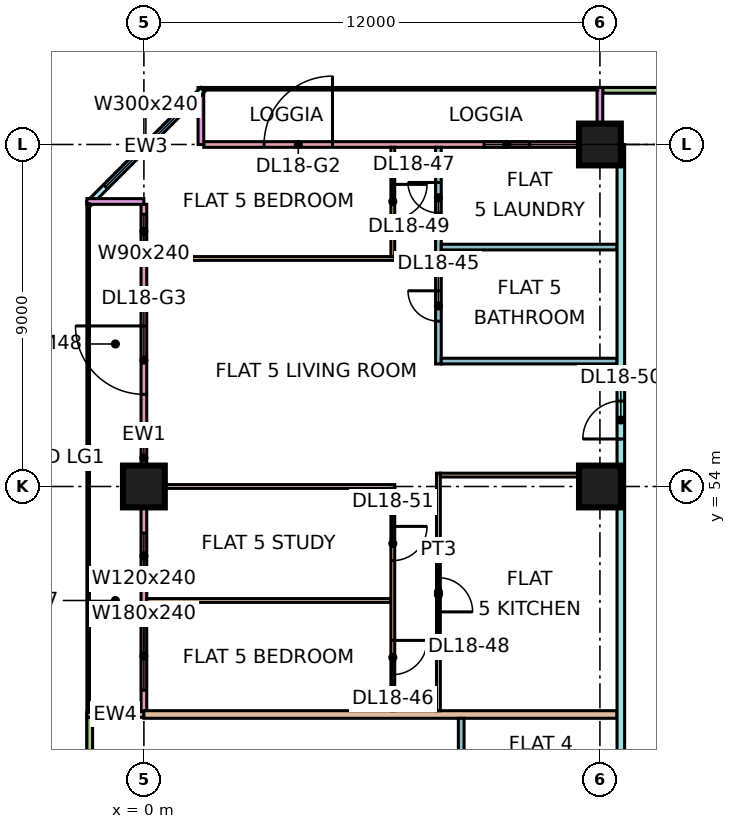
"""IFC4 building model, lengths in metres.
Left out: names, types, materials, properties, quantities, classifications, styles, units other than length and angle.
Written with IfcOpenShell. Run it as: python <this file> out.ifc"""

import sys

from ifc_helpers import new_model, si_unit, direction, frame, frame_2d, origin, origin_2d, place, context, subcontext, project, spatial, rectangle, extrude, element, fill, save


model = new_model("IFC4")
c1 = context("Model", 3, precision=1e-05, world=origin(), true_north=direction((0.0, 1.0)))
c2 = subcontext(c1, "Body", "Model", "MODEL_VIEW")
j1 = project(units=[si_unit("LENGTHUNIT", "METRE"), si_unit("PLANEANGLEUNIT", "RADIAN")], contexts=[c1])
p1 = place(None, origin())
s1 = spatial("IfcSite", under=j1, at=p1, CompositionType="ELEMENT")
p2 = place(p1, origin())
s2 = spatial("IfcBuilding", under=s1, at=p2, CompositionType="ELEMENT")
p3 = place(p2, frame((0.0, 0.0, 82.65)))
s3 = spatial("IfcBuildingStorey", under=s2, at=p3, CompositionType="ELEMENT", Elevation=82.65)
for number, where, z_axis, x_axis in (
    (1, (0.0, 54.0, 0.0), (0.0, 0.0, 1.0), (1.0, 0.0, 0.0)),
    (2, (12.0, 54.0, 0.0), (0.0, 0.0, 1.0), (1.0, 0.0, 0.0)),
    (3, (12.0, 63.0, 0.0), (0.0, 0.0, 1.0), (1.0, 0.0, 0.0)),
):
    element("IfcColumn", number, at=place(p3, frame(where, z_axis=z_axis, x_axis=x_axis)), inside=s3, PredefinedType="COLUMN", context=c2, shape_type="SweptSolid", body=[
        extrude(rectangle(XDim=1.1, YDim=1.1, at=origin_2d()), origin(), (0.0, 0.0, 1.0), 3.75),
    ])
p4 = place(p3, frame((22.5, 64.425, 0.0), z_axis=(0.0, 0.0, 1.0), x_axis=(-1.0, 0.0, 0.0)))
e4 = element("IfcWall", 4, at=p4, inside=s3, PredefinedType="SOLIDWALL", context=c2, shape_type="SweptSolid", body=[
    extrude(rectangle(XDim=10.425, YDim=0.15, at=frame_2d((5.212, 0.0))), origin(), (0.0, 0.0, 1.0), 3.3),
])
p5 = place(p4, frame((1.95, 0.0, 0.45)))
e5 = element("IfcOpeningElement", 5, at=p5, cuts=e4, PredefinedType="OPENING", context=c2, shape_type="SweptSolid", body=[
    extrude(rectangle(XDim=3.0, YDim=2.4, at=frame_2d((1.5, 1.2))), frame((0.0, 0.085, 0.0), z_axis=(0.0, -1.0, 0.0), x_axis=(1.0, 0.0, 0.0)), (0.0, 0.0, 1.0), 0.17),
])
p6 = place(p3, frame((11.925, 63.0, 0.0), z_axis=(0.0, 0.0, 1.0), x_axis=(-1.0, 0.0, 0.0)))
e6 = element("IfcWall", 6, at=p6, inside=s3, PredefinedType="SOLIDWALL", context=c2, shape_type="SweptSolid", body=[
    extrude(rectangle(XDim=10.35, YDim=0.15, at=frame_2d((5.175, 0.0))), origin(), (0.0, 0.0, 1.0), 3.3),
])
p7 = place(p6, frame((1.775, 0.0, 1.7)))
e7 = element("IfcOpeningElement", 7, at=p7, cuts=e6, PredefinedType="OPENING", context=c2, shape_type="SweptSolid", body=[
    extrude(rectangle(XDim=1.2, YDim=0.9, at=frame_2d((0.6, 0.45))), frame((0.0, 0.085, 0.0), z_axis=(0.0, -1.0, 0.0), x_axis=(1.0, 0.0, 0.0)), (0.0, 0.0, 1.0), 0.17),
])
p8 = place(p6, frame((6.962, 0.0, 0.0)))
e8 = element("IfcOpeningElement", 8, at=p8, cuts=e6, PredefinedType="OPENING", context=c2, shape_type="SweptSolid", body=[
    extrude(rectangle(XDim=1.8, YDim=2.4, at=frame_2d((0.9, 1.2))), frame((0.0, 0.085, 0.0), z_axis=(0.0, -1.0, 0.0), x_axis=(1.0, 0.0, 0.0)), (0.0, 0.0, 1.0), 0.17),
])
for number, where, z_axis, x_axis in (
    (9, (12.0, 64.5, 0.0), (0.0, 0.0, 1.0), (0.0, -1.0, 0.0)),
    (10, (1.5, 64.5, 0.0), (0.0, 0.0, 1.0), (0.0, -1.0, 0.0)),
):
    element("IfcWall", number, at=place(p3, frame(where, z_axis=z_axis, x_axis=x_axis)), inside=s3, PredefinedType="SOLIDWALL", context=c2, shape_type="SweptSolid", body=[
        extrude(rectangle(XDim=1.5, YDim=0.15, at=frame_2d((0.75, 0.0))), origin(), (0.0, 0.0, 1.0), 3.3),
    ])
p9 = place(p3, frame((1.553, 64.447, 0.0), z_axis=(0.0, 0.0, 1.0), x_axis=(-0.707106781187, -0.707106781187, 0.0)))
e11 = element("IfcWall", 11, at=p9, inside=s3, PredefinedType="SOLIDWALL", context=c2, shape_type="SweptSolid", body=[
    extrude(rectangle(XDim=4.243, YDim=0.15, at=frame_2d((2.121, 0.0))), origin(), (0.0, 0.0, 1.0), 3.3),
])
p10 = place(p9, frame((0.621, 0.0, 0.45)))
e12 = element("IfcOpeningElement", 12, at=p10, cuts=e11, PredefinedType="OPENING", context=c2, shape_type="SweptSolid", body=[
    extrude(rectangle(XDim=3.0, YDim=2.4, at=frame_2d((1.5, 1.2))), frame((0.0, 0.085, 0.0), z_axis=(0.0, -1.0, 0.0), x_axis=(1.0, 0.0, 0.0)), (0.0, 0.0, 1.0), 0.17),
])
p11 = place(p3, frame((0.0, 61.425, 0.0), z_axis=(0.0, 0.0, 1.0), x_axis=(0.0, -1.0, 0.0)))
e13 = element("IfcWall", 13, at=p11, inside=s3, PredefinedType="SOLIDWALL", context=c2, shape_type="SweptSolid", body=[
    extrude(rectangle(XDim=13.35, YDim=0.15, at=frame_2d((6.675, 0.0))), origin(), (0.0, 0.0, 1.0), 3.3),
])
p12 = place(p11, frame((0.262, 0.0, 0.45)))
e14 = element("IfcOpeningElement", 14, at=p12, cuts=e13, PredefinedType="OPENING", context=c2, shape_type="SweptSolid", body=[
    extrude(rectangle(XDim=0.9, YDim=2.4, at=frame_2d((0.45, 1.2))), frame((0.0, 0.085, 0.0), z_axis=(0.0, -1.0, 0.0), x_axis=(1.0, 0.0, 0.0)), (0.0, 0.0, 1.0), 0.17),
])
p13 = place(p11, frame((3.2, 0.0, 0.0)))
e15 = element("IfcOpeningElement", 15, at=p13, cuts=e13, PredefinedType="OPENING", context=c2, shape_type="SweptSolid", body=[
    extrude(rectangle(XDim=1.8, YDim=2.4, at=frame_2d((0.9, 1.2))), frame((0.0, 0.085, 0.0), z_axis=(0.0, -1.0, 0.0), x_axis=(1.0, 0.0, 0.0)), (0.0, 0.0, 1.0), 0.17),
])
p14 = place(p11, frame((8.65, 0.0, 0.45)))
e16 = element("IfcOpeningElement", 16, at=p14, cuts=e13, PredefinedType="OPENING", context=c2, shape_type="SweptSolid", body=[
    extrude(rectangle(XDim=1.2, YDim=2.4, at=frame_2d((0.6, 1.2))), frame((0.0, 0.085, 0.0), z_axis=(0.0, -1.0, 0.0), x_axis=(1.0, 0.0, 0.0)), (0.0, 0.0, 1.0), 0.17),
])
p15 = place(p11, frame((10.988, 0.0, 0.45)))
e17 = element("IfcOpeningElement", 17, at=p15, cuts=e13, PredefinedType="OPENING", context=c2, shape_type="SweptSolid", body=[
    extrude(rectangle(XDim=1.8, YDim=2.4, at=frame_2d((0.9, 1.2))), frame((0.0, 0.085, 0.0), z_axis=(0.0, -1.0, 0.0), x_axis=(1.0, 0.0, 0.0)), (0.0, 0.0, 1.0), 0.17),
])
for number, where, z_axis, x_axis in (
    (18, (-1.5, 61.5, 0.0), (0.0, 0.0, 1.0), (1.0, 0.0, 0.0)),
    (19, (-1.5, 48.0, 0.0), (0.0, 0.0, 1.0), (1.0, 0.0, 0.0)),
):
    element("IfcWall", number, at=place(p3, frame(where, z_axis=z_axis, x_axis=x_axis)), inside=s3, PredefinedType="SOLIDWALL", context=c2, shape_type="SweptSolid", body=[
        extrude(rectangle(XDim=1.5, YDim=0.15, at=frame_2d((0.75, 0.0))), origin(), (0.0, 0.0, 1.0), 3.3),
    ])
p16 = place(p3, frame((-1.425, 47.925, 0.0), z_axis=(0.0, 0.0, 1.0), x_axis=(0.0, -1.0, 0.0)))
e20 = element("IfcWall", 20, at=p16, inside=s3, PredefinedType="SOLIDWALL", context=c2, shape_type="SweptSolid", body=[
    extrude(rectangle(XDim=11.85, YDim=0.15, at=frame_2d((5.925, 0.0))), origin(), (0.0, 0.0, 1.0), 3.3),
])
p17 = place(p16, frame((1.462, 0.0, 0.45)))
e21 = element("IfcOpeningElement", 21, at=p17, cuts=e20, PredefinedType="OPENING", context=c2, shape_type="SweptSolid", body=[
    extrude(rectangle(XDim=3.0, YDim=2.4, at=frame_2d((1.5, 1.2))), frame((0.0, 0.085, 0.0), z_axis=(0.0, -1.0, 0.0), x_axis=(1.0, 0.0, 0.0)), (0.0, 0.0, 1.0), 0.17),
])
p18 = place(p16, frame((7.387, 0.0, 0.45)))
e22 = element("IfcOpeningElement", 22, at=p18, cuts=e20, PredefinedType="OPENING", context=c2, shape_type="SweptSolid", body=[
    extrude(rectangle(XDim=3.0, YDim=2.4, at=frame_2d((1.5, 1.2))), frame((0.0, 0.085, 0.0), z_axis=(0.0, -1.0, 0.0), x_axis=(1.0, 0.0, 0.0)), (0.0, 0.0, 1.0), 0.17),
])
p19 = place(p3, frame((0.0, 48.0, 0.0), z_axis=(0.0, 0.0, 1.0), x_axis=(1.0, 0.0, 0.0)))
e23 = element("IfcWall", 23, at=p19, inside=s3, PredefinedType="PARTITIONING", context=c2, shape_type="SweptSolid", body=[
    extrude(rectangle(XDim=12.45, YDim=0.2, at=frame_2d((6.225, 0.0))), origin(), (0.0, 0.0, 1.0), 3.3),
])
p20 = place(p3, frame((0.074, 51.0, 0.0), z_axis=(0.0, 0.0, 1.0), x_axis=(1.0, 0.0, 0.0)))
e24 = element("IfcWall", 24, at=p20, inside=s3, PredefinedType="PARTITIONING", context=c2, shape_type="SweptSolid", body=[
    extrude(rectangle(XDim=6.426, YDim=0.1, at=frame_2d((3.213, 0.0))), origin(), (0.0, 0.0, 1.0), 3.3),
])
for number, where, z_axis, x_axis in (
    (25, (0.074, 54.0, 0.0), (0.0, 0.0, 1.0), (1.0, 0.0, 0.0)),
    (26, (0.074, 60.0, 0.0), (0.0, 0.0, 1.0), (1.0, 0.0, 0.0)),
):
    element("IfcWall", number, at=place(p3, frame(where, z_axis=z_axis, x_axis=x_axis)), inside=s3, PredefinedType="PARTITIONING", context=c2, shape_type="SweptSolid", body=[
        extrude(rectangle(XDim=6.526, YDim=0.1, at=frame_2d((3.263, 0.0))), origin(), (0.0, 0.0, 1.0), 3.3),
    ])
p21 = place(p3, frame((6.55, 48.1, 0.0), z_axis=(0.0, 0.0, 1.0), x_axis=(0.0, 1.0, 0.0)))
e27 = element("IfcWall", 27, at=p21, inside=s3, PredefinedType="PARTITIONING", context=c2, shape_type="SweptSolid", body=[
    extrude(rectangle(XDim=5.85, YDim=0.1, at=frame_2d((2.925, 0.0))), origin(), (0.0, 0.0, 1.0), 3.3),
])
p22 = place(p21, frame((0.95, 0.0, 0.0)))
e28 = element("IfcOpeningElement", 28, at=p22, cuts=e27, PredefinedType="OPENING", context=c2, shape_type="SweptSolid", body=[
    extrude(rectangle(XDim=0.9, YDim=2.1, at=frame_2d((0.45, 1.05))), frame((0.0, 0.06, 0.0), z_axis=(0.0, -1.0, 0.0), x_axis=(1.0, 0.0, 0.0)), (0.0, 0.0, 1.0), 0.12),
])
p23 = place(p21, frame((3.95, 0.0, 0.0)))
e29 = element("IfcOpeningElement", 29, at=p23, cuts=e27, PredefinedType="OPENING", context=c2, shape_type="SweptSolid", body=[
    extrude(rectangle(XDim=0.9, YDim=2.1, at=frame_2d((0.45, 1.05))), frame((0.0, 0.06, 0.0), z_axis=(0.0, -1.0, 0.0), x_axis=(1.0, 0.0, 0.0)), (0.0, 0.0, 1.0), 0.12),
])
p24 = place(p3, frame((6.55, 60.05, 0.0), z_axis=(0.0, 0.0, 1.0), x_axis=(0.0, 1.0, 0.0)))
e30 = element("IfcWall", 30, at=p24, inside=s3, PredefinedType="PARTITIONING", context=c2, shape_type="SweptSolid", body=[
    extrude(rectangle(XDim=2.876, YDim=0.1, at=frame_2d((1.438, 0.0))), origin(), (0.0, 0.0, 1.0), 3.3),
])
p25 = place(p24, frame((1.0, 0.0, 0.0)))
e31 = element("IfcOpeningElement", 31, at=p25, cuts=e30, PredefinedType="OPENING", context=c2, shape_type="SweptSolid", body=[
    extrude(rectangle(XDim=0.9, YDim=2.1, at=frame_2d((0.45, 1.05))), frame((0.0, 0.06, 0.0), z_axis=(0.0, -1.0, 0.0), x_axis=(1.0, 0.0, 0.0)), (0.0, 0.0, 1.0), 0.12),
])
p26 = place(p3, frame((7.75, 48.1, 0.0), z_axis=(0.0, 0.0, 1.0), x_axis=(0.0, 1.0, 0.0)))
e32 = element("IfcWall", 32, at=p26, inside=s3, PredefinedType="PARTITIONING", context=c2, shape_type="SweptSolid", body=[
    extrude(rectangle(XDim=6.25, YDim=0.1, at=frame_2d((3.125, 0.0))), origin(), (0.0, 0.0, 1.0), 3.3),
])
p27 = place(p26, frame((2.6, 0.0, 0.0)))
e33 = element("IfcOpeningElement", 33, at=p27, cuts=e32, PredefinedType="OPENING", context=c2, shape_type="SweptSolid", body=[
    extrude(rectangle(XDim=0.9, YDim=2.1, at=frame_2d((0.45, 1.05))), frame((0.0, 0.06, 0.0), z_axis=(0.0, -1.0, 0.0), x_axis=(1.0, 0.0, 0.0)), (0.0, 0.0, 1.0), 0.12),
])
p28 = place(p3, frame((7.75, 57.225, 0.0), z_axis=(0.0, 0.0, 1.0), x_axis=(0.0, 1.0, 0.0)))
e34 = element("IfcWall", 34, at=p28, inside=s3, PredefinedType="PARTITIONING", context=c2, shape_type="SweptSolid", body=[
    extrude(rectangle(XDim=5.701, YDim=0.15, at=frame_2d((2.851, 0.0))), origin(), (0.0, 0.0, 1.0), 3.3),
])
p29 = place(p28, frame((1.125, 0.0, 0.0)))
e35 = element("IfcOpeningElement", 35, at=p29, cuts=e34, PredefinedType="OPENING", context=c2, shape_type="SweptSolid", body=[
    extrude(rectangle(XDim=0.8, YDim=2.1, at=frame_2d((0.4, 1.05))), frame((0.0, 0.085, 0.0), z_axis=(0.0, -1.0, 0.0), x_axis=(1.0, 0.0, 0.0)), (0.0, 0.0, 1.0), 0.17),
])
p30 = place(p28, frame((3.975, 0.0, 0.0)))
e36 = element("IfcOpeningElement", 36, at=p30, cuts=e34, PredefinedType="OPENING", context=c2, shape_type="SweptSolid", body=[
    extrude(rectangle(XDim=0.8, YDim=2.1, at=frame_2d((0.4, 1.05))), frame((0.0, 0.085, 0.0), z_axis=(0.0, -1.0, 0.0), x_axis=(1.0, 0.0, 0.0)), (0.0, 0.0, 1.0), 0.17),
])
p31 = place(p3, frame((7.8, 54.3, 0.0), z_axis=(0.0, 0.0, 1.0), x_axis=(1.0, 0.0, 0.0)))
e37 = element("IfcWall", 37, at=p31, inside=s3, PredefinedType="PARTITIONING", context=c2, shape_type="SweptSolid", body=[
    extrude(rectangle(XDim=4.65, YDim=0.1, at=frame_2d((2.325, 0.0))), origin(), (0.0, 0.0, 1.0), 3.3),
])
for number, where, z_axis, x_axis in (
    (38, (7.825, 57.3, 0.0), (0.0, 0.0, 1.0), (1.0, 0.0, 0.0)),
    (39, (7.825, 60.3, 0.0), (0.0, 0.0, 1.0), (1.0, 0.0, 0.0)),
):
    element("IfcWall", number, at=place(p3, frame(where, z_axis=z_axis, x_axis=x_axis)), inside=s3, PredefinedType="PARTITIONING", context=c2, shape_type="SweptSolid", body=[
        extrude(rectangle(XDim=4.625, YDim=0.15, at=frame_2d((2.312, 0.0))), origin(), (0.0, 0.0, 1.0), 3.3),
    ])
p32 = place(p3, frame((8.35, 38.925, 0.0), z_axis=(0.0, 0.0, 1.0), x_axis=(0.0, 1.0, 0.0)))
e40 = element("IfcWall", 40, at=p32, inside=s3, PredefinedType="PARTITIONING", context=c2, shape_type="SweptSolid", body=[
    extrude(rectangle(XDim=8.975, YDim=0.15, at=frame_2d((4.487, 0.0))), origin(), (0.0, 0.0, 1.0), 3.3),
])
p33 = place(p32, frame((5.925, 0.0, 0.0)))
e41 = element("IfcOpeningElement", 41, at=p33, cuts=e40, PredefinedType="OPENING", context=c2, shape_type="SweptSolid", body=[
    extrude(rectangle(XDim=0.9, YDim=2.1, at=frame_2d((0.45, 1.05))), frame((0.0, 0.085, 0.0), z_axis=(0.0, -1.0, 0.0), x_axis=(1.0, 0.0, 0.0)), (0.0, 0.0, 1.0), 0.17),
])
p34 = place(p3, frame((12.55, 20.0, 0.0), z_axis=(0.0, 0.0, 1.0), x_axis=(0.0, 1.0, 0.0)))
e42 = element("IfcWall", 42, at=p34, inside=s3, PredefinedType="PARTITIONING", context=c2, shape_type="SweptSolid", body=[
    extrude(rectangle(XDim=43.0, YDim=0.2, at=frame_2d((21.5, 0.0))), origin(), (0.0, 0.0, 1.0), 3.3),
])
p35 = place(p34, frame((16.95, 0.0, 0.0)))
e43 = element("IfcOpeningElement", 43, at=p35, cuts=e42, PredefinedType="OPENING", context=c2, shape_type="SweptSolid", body=[
    extrude(rectangle(XDim=1.0, YDim=2.1, at=frame_2d((0.5, 1.05))), frame((0.0, 0.11, 0.0), z_axis=(0.0, -1.0, 0.0), x_axis=(1.0, 0.0, 0.0)), (0.0, 0.0, 1.0), 0.22),
])
p36 = place(p34, frame((35.25, 0.0, 0.0)))
e44 = element("IfcOpeningElement", 44, at=p36, cuts=e42, PredefinedType="OPENING", context=c2, shape_type="SweptSolid", body=[
    extrude(rectangle(XDim=1.0, YDim=2.1, at=frame_2d((0.5, 1.05))), frame((0.0, 0.11, 0.0), z_axis=(0.0, -1.0, 0.0), x_axis=(1.0, 0.0, 0.0)), (0.0, 0.0, 1.0), 0.22),
])
p37 = place(p34, frame((0.6, 0.0, 0.0)))
e45 = element("IfcOpeningElement", 45, at=p37, cuts=e42, PredefinedType="OPENING", context=c2, shape_type="SweptSolid", body=[
    extrude(rectangle(XDim=1.2, YDim=2.1, at=frame_2d((0.6, 1.05))), frame((0.0, 0.11, 0.0), z_axis=(0.0, -1.0, 0.0), x_axis=(1.0, 0.0, 0.0)), (0.0, 0.0, 1.0), 0.22),
])
p38 = place(p34, frame((14.1, 0.0, 0.0)))
e46 = element("IfcOpeningElement", 46, at=p38, cuts=e42, PredefinedType="OPENING", context=c2, shape_type="SweptSolid", body=[
    extrude(rectangle(XDim=1.0, YDim=2.1, at=frame_2d((0.5, 1.05))), frame((0.0, 0.11, 0.0), z_axis=(0.0, -1.0, 0.0), x_axis=(1.0, 0.0, 0.0)), (0.0, 0.0, 1.0), 0.22),
])
p39 = place(p7, origin())
e47 = element("IfcWindow", 47, at=p39, inside=s3, PartitioningType="SINGLE_PANEL", PredefinedType="WINDOW", context=c2, shape_type="SweptSolid", body=[
    extrude(rectangle(XDim=1.2, YDim=0.9, at=frame_2d((0.6, 0.45))), frame((0.0, 0.03, 0.0), z_axis=(0.0, -1.0, 0.0), x_axis=(1.0, 0.0, 0.0)), (0.0, 0.0, 1.0), 0.06),
])
fill(e7, e47)
p40 = place(p8, frame((1.8, 0.0, 0.0), z_axis=(0.0, 0.0, 1.0), x_axis=(-1.0, 0.0, 0.0)))
e48 = element("IfcDoor", 48, at=p40, inside=s3, OperationType="DOUBLE_DOOR_SINGLE_SWING", PredefinedType="DOOR", context=c2, shape_type="SweptSolid", body=[
    extrude(rectangle(XDim=1.8, YDim=2.4, at=frame_2d((0.9, 1.2))), frame((0.0, 0.025, 0.0), z_axis=(0.0, -1.0, 0.0), x_axis=(1.0, 0.0, 0.0)), (0.0, 0.0, 1.0), 0.05),
])
fill(e8, e48)
p41 = place(p10, origin())
e49 = element("IfcWindow", 49, at=p41, inside=s3, PartitioningType="SINGLE_PANEL", PredefinedType="WINDOW", context=c2, shape_type="SweptSolid", body=[
    extrude(rectangle(XDim=3.0, YDim=2.4, at=frame_2d((1.5, 1.2))), frame((0.0, 0.03, 0.0), z_axis=(0.0, -1.0, 0.0), x_axis=(1.0, 0.0, 0.0)), (0.0, 0.0, 1.0), 0.06),
])
fill(e12, e49)
p42 = place(p12, origin())
e50 = element("IfcWindow", 50, at=p42, inside=s3, PartitioningType="SINGLE_PANEL", PredefinedType="WINDOW", context=c2, shape_type="SweptSolid", body=[
    extrude(rectangle(XDim=0.9, YDim=2.4, at=frame_2d((0.45, 1.2))), frame((0.0, 0.03, 0.0), z_axis=(0.0, -1.0, 0.0), x_axis=(1.0, 0.0, 0.0)), (0.0, 0.0, 1.0), 0.06),
])
fill(e14, e50)
p43 = place(p13, frame((1.8, 0.0, 0.0), z_axis=(0.0, 0.0, 1.0), x_axis=(-1.0, 0.0, 0.0)))
e51 = element("IfcDoor", 51, at=p43, inside=s3, OperationType="DOUBLE_DOOR_SINGLE_SWING", PredefinedType="DOOR", context=c2, shape_type="SweptSolid", body=[
    extrude(rectangle(XDim=1.8, YDim=2.4, at=frame_2d((0.9, 1.2))), frame((0.0, 0.025, 0.0), z_axis=(0.0, -1.0, 0.0), x_axis=(1.0, 0.0, 0.0)), (0.0, 0.0, 1.0), 0.05),
])
fill(e15, e51)
p44 = place(p14, origin())
e52 = element("IfcWindow", 52, at=p44, inside=s3, PartitioningType="SINGLE_PANEL", PredefinedType="WINDOW", context=c2, shape_type="SweptSolid", body=[
    extrude(rectangle(XDim=1.2, YDim=2.4, at=frame_2d((0.6, 1.2))), frame((0.0, 0.03, 0.0), z_axis=(0.0, -1.0, 0.0), x_axis=(1.0, 0.0, 0.0)), (0.0, 0.0, 1.0), 0.06),
])
fill(e16, e52)
p45 = place(p15, origin())
e53 = element("IfcWindow", 53, at=p45, inside=s3, PartitioningType="SINGLE_PANEL", PredefinedType="WINDOW", context=c2, shape_type="SweptSolid", body=[
    extrude(rectangle(XDim=1.8, YDim=2.4, at=frame_2d((0.9, 1.2))), frame((0.0, 0.03, 0.0), z_axis=(0.0, -1.0, 0.0), x_axis=(1.0, 0.0, 0.0)), (0.0, 0.0, 1.0), 0.06),
])
fill(e17, e53)
p46 = place(p29, frame((0.8, 0.0, 0.0), z_axis=(0.0, 0.0, 1.0), x_axis=(-1.0, 0.0, 0.0)))
e54 = element("IfcDoor", 54, at=p46, inside=s3, OperationType="SINGLE_SWING_RIGHT", PredefinedType="DOOR", context=c2, shape_type="SweptSolid", body=[
    extrude(rectangle(XDim=0.8, YDim=2.1, at=frame_2d((0.4, 1.05))), frame((0.0, 0.025, 0.0), z_axis=(0.0, -1.0, 0.0), x_axis=(1.0, 0.0, 0.0)), (0.0, 0.0, 1.0), 0.05),
])
fill(e35, e54)
p47 = place(p22, origin())
e55 = element("IfcDoor", 55, at=p47, inside=s3, OperationType="SINGLE_SWING_RIGHT", PredefinedType="DOOR", context=c2, shape_type="SweptSolid", body=[
    extrude(rectangle(XDim=0.9, YDim=2.1, at=frame_2d((0.45, 1.05))), frame((0.0, 0.025, 0.0), z_axis=(0.0, -1.0, 0.0), x_axis=(1.0, 0.0, 0.0)), (0.0, 0.0, 1.0), 0.05),
])
fill(e28, e55)
p48 = place(p25, origin())
e56 = element("IfcDoor", 56, at=p48, inside=s3, OperationType="SINGLE_SWING_RIGHT", PredefinedType="DOOR", context=c2, shape_type="SweptSolid", body=[
    extrude(rectangle(XDim=0.9, YDim=2.1, at=frame_2d((0.45, 1.05))), frame((0.0, 0.025, 0.0), z_axis=(0.0, -1.0, 0.0), x_axis=(1.0, 0.0, 0.0)), (0.0, 0.0, 1.0), 0.05),
])
fill(e31, e56)
p49 = place(p27, frame((0.9, 0.0, 0.0), z_axis=(0.0, 0.0, 1.0), x_axis=(-1.0, 0.0, 0.0)))
e57 = element("IfcDoor", 57, at=p49, inside=s3, OperationType="SINGLE_SWING_LEFT", PredefinedType="DOOR", context=c2, shape_type="SweptSolid", body=[
    extrude(rectangle(XDim=0.9, YDim=2.1, at=frame_2d((0.45, 1.05))), frame((0.0, 0.025, 0.0), z_axis=(0.0, -1.0, 0.0), x_axis=(1.0, 0.0, 0.0)), (0.0, 0.0, 1.0), 0.05),
])
fill(e33, e57)
p50 = place(p30, frame((0.8, 0.0, 0.0), z_axis=(0.0, 0.0, 1.0), x_axis=(-1.0, 0.0, 0.0)))
e58 = element("IfcDoor", 58, at=p50, inside=s3, OperationType="SINGLE_SWING_RIGHT", PredefinedType="DOOR", context=c2, shape_type="SweptSolid", body=[
    extrude(rectangle(XDim=0.8, YDim=2.1, at=frame_2d((0.4, 1.05))), frame((0.0, 0.025, 0.0), z_axis=(0.0, -1.0, 0.0), x_axis=(1.0, 0.0, 0.0)), (0.0, 0.0, 1.0), 0.05),
])
fill(e36, e58)
p51 = place(p36, origin())
e59 = element("IfcDoor", 59, at=p51, inside=s3, OperationType="SINGLE_SWING_LEFT", PredefinedType="DOOR", context=c2, shape_type="SweptSolid", body=[
    extrude(rectangle(XDim=1.0, YDim=2.1, at=frame_2d((0.5, 1.05))), frame((0.0, 0.025, 0.0), z_axis=(0.0, -1.0, 0.0), x_axis=(1.0, 0.0, 0.0)), (0.0, 0.0, 1.0), 0.05),
])
fill(e44, e59)
p52 = place(p23, origin())
e60 = element("IfcDoor", 60, at=p52, inside=s3, OperationType="SINGLE_SWING_RIGHT", PredefinedType="DOOR", context=c2, shape_type="SweptSolid", body=[
    extrude(rectangle(XDim=0.9, YDim=2.1, at=frame_2d((0.45, 1.05))), frame((0.0, 0.025, 0.0), z_axis=(0.0, -1.0, 0.0), x_axis=(1.0, 0.0, 0.0)), (0.0, 0.0, 1.0), 0.05),
])
fill(e29, e60)
save(model, sys.argv[1])
